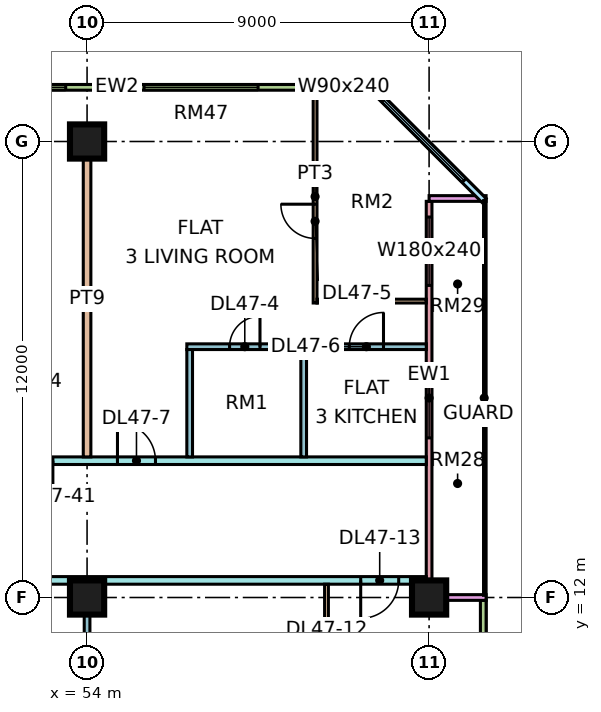
"""IFC4 building model, lengths in metres.
Left out: names, types, materials, properties, quantities, classifications, styles, units other than length and angle.
Written with IfcOpenShell. Run it as: python <this file> out.ifc"""

import sys

from ifc_helpers import new_model, si_unit, direction, frame, frame_2d, origin, origin_2d, place, context, subcontext, project, spatial, rectangle, extrude, element, fill, save


model = new_model("IFC4")
c1 = context("Model", 3, precision=1e-05, world=origin(), true_north=direction((0.0, 1.0)))
c2 = subcontext(c1, "Body", "Model", "MODEL_VIEW")
j1 = project(units=[si_unit("LENGTHUNIT", "METRE"), si_unit("PLANEANGLEUNIT", "RADIAN")], contexts=[c1])
p1 = place(None, origin())
s1 = spatial("IfcSite", under=j1, at=p1, CompositionType="ELEMENT")
p2 = place(p1, origin())
s2 = spatial("IfcBuilding", under=s1, at=p2, CompositionType="ELEMENT")
p3 = place(p2, frame((0.0, 0.0, 202.4)))
s3 = spatial("IfcBuildingStorey", under=s2, at=p3, CompositionType="ELEMENT", Elevation=202.4)
for number, where, z_axis, x_axis in (
    (1, (54.0, 12.0, 0.0), (0.0, 0.0, 1.0), (1.0, 0.0, 0.0)),
    (2, (54.0, 24.0, 0.0), (0.0, 0.0, 1.0), (1.0, 0.0, 0.0)),
    (3, (63.0, 12.0, 0.0), (0.0, 0.0, 1.0), (1.0, 0.0, 0.0)),
):
    element("IfcColumn", number, at=place(p3, frame(where, z_axis=z_axis, x_axis=x_axis)), inside=s3, PredefinedType="COLUMN", context=c2, shape_type="SweptSolid", body=[
        extrude(rectangle(XDim=0.9, YDim=0.9, at=origin_2d()), origin(), (0.0, 0.0, 1.0), 3.75),
    ])
p4 = place(p3, frame((61.5, 25.425, 0.0), z_axis=(0.0, 0.0, 1.0), x_axis=(-1.0, 0.0, 0.0)))
e4 = element("IfcWall", 4, at=p4, inside=s3, PredefinedType="SOLIDWALL", context=c2, shape_type="SweptSolid", body=[
    extrude(rectangle(XDim=13.425, YDim=0.15, at=frame_2d((6.712, 0.0))), origin(), (0.0, 0.0, 1.0), 3.3),
])
p5 = place(p4, frame((0.3, 0.0, 0.45)))
e5 = element("IfcOpeningElement", 5, at=p5, cuts=e4, PredefinedType="OPENING", context=c2, shape_type="SweptSolid", body=[
    extrude(rectangle(XDim=0.9, YDim=2.4, at=frame_2d((0.45, 1.2))), frame((0.0, 0.085, 0.0), z_axis=(0.0, -1.0, 0.0), x_axis=(1.0, 0.0, 0.0)), (0.0, 0.0, 1.0), 0.17),
])
p6 = place(p4, frame((3.0, 0.0, 0.45)))
e6 = element("IfcOpeningElement", 6, at=p6, cuts=e4, PredefinedType="OPENING", context=c2, shape_type="SweptSolid", body=[
    extrude(rectangle(XDim=3.0, YDim=2.4, at=frame_2d((1.5, 1.2))), frame((0.0, 0.085, 0.0), z_axis=(0.0, -1.0, 0.0), x_axis=(1.0, 0.0, 0.0)), (0.0, 0.0, 1.0), 0.17),
])
p7 = place(p4, frame((8.062, 0.0, 0.45)))
e7 = element("IfcOpeningElement", 7, at=p7, cuts=e4, PredefinedType="OPENING", context=c2, shape_type="SweptSolid", body=[
    extrude(rectangle(XDim=4.8, YDim=2.4, at=frame_2d((2.4, 1.2))), frame((0.0, 0.085, 0.0), z_axis=(0.0, -1.0, 0.0), x_axis=(1.0, 0.0, 0.0)), (0.0, 0.0, 1.0), 0.17),
])
p8 = place(p3, frame((64.425, 1.5, 0.0), z_axis=(0.0, 0.0, 1.0), x_axis=(0.0, 1.0, 0.0)))
e8 = element("IfcWall", 8, at=p8, inside=s3, PredefinedType="SOLIDWALL", context=c2, shape_type="SweptSolid", body=[
    extrude(rectangle(XDim=10.425, YDim=0.15, at=frame_2d((5.212, 0.0))), origin(), (0.0, 0.0, 1.0), 3.3),
])
p9 = place(p8, frame((3.712, 0.0, 0.45)))
e9 = element("IfcOpeningElement", 9, at=p9, cuts=e8, PredefinedType="OPENING", context=c2, shape_type="SweptSolid", body=[
    extrude(rectangle(XDim=3.0, YDim=2.4, at=frame_2d((1.5, 1.2))), frame((0.0, 0.085, 0.0), z_axis=(0.0, -1.0, 0.0), x_axis=(1.0, 0.0, 0.0)), (0.0, 0.0, 1.0), 0.17),
])
p10 = place(p3, frame((63.0, 12.075, 0.0), z_axis=(0.0, 0.0, 1.0), x_axis=(0.0, 1.0, 0.0)))
e10 = element("IfcWall", 10, at=p10, inside=s3, PredefinedType="SOLIDWALL", context=c2, shape_type="SweptSolid", body=[
    extrude(rectangle(XDim=10.35, YDim=0.15, at=frame_2d((5.175, 0.0))), origin(), (0.0, 0.0, 1.0), 3.3),
])
p11 = place(p10, frame((4.125, 0.0, 0.45)))
e11 = element("IfcOpeningElement", 11, at=p11, cuts=e10, PredefinedType="OPENING", context=c2, shape_type="SweptSolid", body=[
    extrude(rectangle(XDim=1.8, YDim=2.4, at=frame_2d((0.9, 1.2))), frame((0.0, 0.085, 0.0), z_axis=(0.0, -1.0, 0.0), x_axis=(1.0, 0.0, 0.0)), (0.0, 0.0, 1.0), 0.17),
])
p12 = place(p10, frame((8.137, 0.0, 0.45)))
e12 = element("IfcOpeningElement", 12, at=p12, cuts=e10, PredefinedType="OPENING", context=c2, shape_type="SweptSolid", body=[
    extrude(rectangle(XDim=1.8, YDim=2.4, at=frame_2d((0.9, 1.2))), frame((0.0, 0.085, 0.0), z_axis=(0.0, -1.0, 0.0), x_axis=(1.0, 0.0, 0.0)), (0.0, 0.0, 1.0), 0.17),
])
for number, where, z_axis, x_axis in (
    (13, (64.5, 12.0, 0.0), (0.0, 0.0, 1.0), (-1.0, 0.0, 0.0)),
    (14, (64.5, 22.5, 0.0), (0.0, 0.0, 1.0), (-1.0, 0.0, 0.0)),
):
    element("IfcWall", number, at=place(p3, frame(where, z_axis=z_axis, x_axis=x_axis)), inside=s3, PredefinedType="SOLIDWALL", context=c2, shape_type="SweptSolid", body=[
        extrude(rectangle(XDim=1.5, YDim=0.15, at=frame_2d((0.75, 0.0))), origin(), (0.0, 0.0, 1.0), 3.3),
    ])
p13 = place(p3, frame((64.447, 22.447, 0.0), z_axis=(0.0, 0.0, 1.0), x_axis=(-0.707106781187, 0.707106781187, 0.0)))
e15 = element("IfcWall", 15, at=p13, inside=s3, PredefinedType="SOLIDWALL", context=c2, shape_type="SweptSolid", body=[
    extrude(rectangle(XDim=4.243, YDim=0.15, at=frame_2d((2.121, 0.0))), origin(), (0.0, 0.0, 1.0), 3.3),
])
p14 = place(p13, frame((0.744, 0.0, 0.45)))
e16 = element("IfcOpeningElement", 16, at=p14, cuts=e15, PredefinedType="OPENING", context=c2, shape_type="SweptSolid", body=[
    extrude(rectangle(XDim=3.0, YDim=2.4, at=frame_2d((1.5, 1.2))), frame((0.0, 0.085, 0.0), z_axis=(0.0, -1.0, 0.0), x_axis=(1.0, 0.0, 0.0)), (0.0, 0.0, 1.0), 0.17),
])
p15 = place(p3, frame((40.65, 12.45, 0.0), z_axis=(0.0, 0.0, 1.0), x_axis=(1.0, 0.0, 0.0)))
e17 = element("IfcWall", 17, at=p15, inside=s3, PredefinedType="PARTITIONING", context=c2, shape_type="SweptSolid", body=[
    extrude(rectangle(XDim=22.276, YDim=0.2, at=frame_2d((11.138, 0.0))), origin(), (0.0, 0.0, 1.0), 3.3),
])
p16 = place(p15, frame((20.55, 0.0, 0.0)))
e18 = element("IfcOpeningElement", 18, at=p16, cuts=e17, PredefinedType="OPENING", context=c2, shape_type="SweptSolid", body=[
    extrude(rectangle(XDim=1.0, YDim=2.1, at=frame_2d((0.5, 1.05))), frame((0.0, 0.11, 0.0), z_axis=(0.0, -1.0, 0.0), x_axis=(1.0, 0.0, 0.0)), (0.0, 0.0, 1.0), 0.22),
])
p17 = place(p15, frame((1.05, 0.0, 0.0)))
e19 = element("IfcOpeningElement", 19, at=p17, cuts=e17, PredefinedType="OPENING", context=c2, shape_type="SweptSolid", body=[
    extrude(rectangle(XDim=1.0, YDim=2.1, at=frame_2d((0.5, 1.05))), frame((0.0, 0.11, 0.0), z_axis=(0.0, -1.0, 0.0), x_axis=(1.0, 0.0, 0.0)), (0.0, 0.0, 1.0), 0.22),
])
p18 = place(p3, frame((51.225, 15.6, 0.0), z_axis=(0.0, 0.0, 1.0), x_axis=(1.0, 0.0, 0.0)))
e20 = element("IfcWall", 20, at=p18, inside=s3, PredefinedType="PARTITIONING", context=c2, shape_type="SweptSolid", body=[
    extrude(rectangle(XDim=11.701, YDim=0.2, at=frame_2d((5.851, 0.0))), origin(), (0.0, 0.0, 1.0), 3.3),
])
p19 = place(p18, frame((3.575, 0.0, 0.0)))
e21 = element("IfcOpeningElement", 21, at=p19, cuts=e20, PredefinedType="OPENING", context=c2, shape_type="SweptSolid", body=[
    extrude(rectangle(XDim=1.0, YDim=2.1, at=frame_2d((0.5, 1.05))), frame((0.0, 0.11, 0.0), z_axis=(0.0, -1.0, 0.0), x_axis=(1.0, 0.0, 0.0)), (0.0, 0.0, 1.0), 0.22),
])
p20 = place(p18, frame((0.875, 0.0, 0.0)))
e22 = element("IfcOpeningElement", 22, at=p20, cuts=e20, PredefinedType="OPENING", context=c2, shape_type="SweptSolid", body=[
    extrude(rectangle(XDim=1.0, YDim=2.1, at=frame_2d((0.5, 1.05))), frame((0.0, 0.11, 0.0), z_axis=(0.0, -1.0, 0.0), x_axis=(1.0, 0.0, 0.0)), (0.0, 0.0, 1.0), 0.22),
])
p21 = place(p3, frame((54.0, 7.725, 0.0), z_axis=(0.0, 0.0, 1.0), x_axis=(0.0, 1.0, 0.0)))
e23 = element("IfcWall", 23, at=p21, inside=s3, PredefinedType="PARTITIONING", context=c2, shape_type="SweptSolid", body=[
    extrude(rectangle(XDim=4.625, YDim=0.15, at=frame_2d((2.312, 0.0))), origin(), (0.0, 0.0, 1.0), 3.3),
])
p22 = place(p3, frame((54.0, 15.7, 0.0), z_axis=(0.0, 0.0, 1.0), x_axis=(0.0, 1.0, 0.0)))
e24 = element("IfcWall", 24, at=p22, inside=s3, PredefinedType="PARTITIONING", context=c2, shape_type="SweptSolid", body=[
    extrude(rectangle(XDim=8.3, YDim=0.2, at=frame_2d((4.15, 0.0))), origin(), (0.0, 0.0, 1.0), 3.3),
])
p23 = place(p3, frame((56.625, 18.6, 0.0), z_axis=(0.0, 0.0, 1.0), x_axis=(1.0, 0.0, 0.0)))
e25 = element("IfcWall", 25, at=p23, inside=s3, PredefinedType="PARTITIONING", context=c2, shape_type="SweptSolid", body=[
    extrude(rectangle(XDim=6.301, YDim=0.15, at=frame_2d((3.15, 0.0))), origin(), (0.0, 0.0, 1.0), 3.3),
])
p24 = place(p23, frame((1.125, 0.0, 0.0)))
e26 = element("IfcOpeningElement", 26, at=p24, cuts=e25, PredefinedType="OPENING", context=c2, shape_type="SweptSolid", body=[
    extrude(rectangle(XDim=0.8, YDim=2.1, at=frame_2d((0.4, 1.05))), frame((0.0, 0.085, 0.0), z_axis=(0.0, -1.0, 0.0), x_axis=(1.0, 0.0, 0.0)), (0.0, 0.0, 1.0), 0.17),
])
p25 = place(p23, frame((4.275, 0.0, 0.0)))
e27 = element("IfcOpeningElement", 27, at=p25, cuts=e25, PredefinedType="OPENING", context=c2, shape_type="SweptSolid", body=[
    extrude(rectangle(XDim=0.9, YDim=2.1, at=frame_2d((0.45, 1.05))), frame((0.0, 0.085, 0.0), z_axis=(0.0, -1.0, 0.0), x_axis=(1.0, 0.0, 0.0)), (0.0, 0.0, 1.0), 0.17),
])
for number, where, z_axis, x_axis in (
    (28, (56.7, 15.7, 0.0), (0.0, 0.0, 1.0), (0.0, 1.0, 0.0)),
    (29, (59.7, 15.7, 0.0), (0.0, 0.0, 1.0), (0.0, 1.0, 0.0)),
):
    element("IfcWall", number, at=place(p3, frame(where, z_axis=z_axis, x_axis=x_axis)), inside=s3, PredefinedType="PARTITIONING", context=c2, shape_type="SweptSolid", body=[
        extrude(rectangle(XDim=2.825, YDim=0.15, at=frame_2d((1.413, 0.0))), origin(), (0.0, 0.0, 1.0), 3.3),
    ])
p26 = place(p3, frame((60.0, 19.75, 0.0), z_axis=(0.0, 0.0, 1.0), x_axis=(0.0, 1.0, 0.0)))
e30 = element("IfcWall", 30, at=p26, inside=s3, PredefinedType="PARTITIONING", context=c2, shape_type="SweptSolid", body=[
    extrude(rectangle(XDim=5.6, YDim=0.1, at=frame_2d((2.8, 0.0))), origin(), (0.0, 0.0, 1.0), 3.3),
])
p27 = place(p26, frame((1.7, 0.0, 0.0)))
e31 = element("IfcOpeningElement", 31, at=p27, cuts=e30, PredefinedType="OPENING", context=c2, shape_type="SweptSolid", body=[
    extrude(rectangle(XDim=0.9, YDim=2.1, at=frame_2d((0.45, 1.05))), frame((0.0, 0.06, 0.0), z_axis=(0.0, -1.0, 0.0), x_axis=(1.0, 0.0, 0.0)), (0.0, 0.0, 1.0), 0.12),
])
p28 = place(p3, frame((60.05, 19.8, 0.0), z_axis=(0.0, 0.0, 1.0), x_axis=(1.0, 0.0, 0.0)))
e32 = element("IfcWall", 32, at=p28, inside=s3, PredefinedType="PARTITIONING", context=c2, shape_type="SweptSolid", body=[
    extrude(rectangle(XDim=2.876, YDim=0.1, at=frame_2d((1.438, 0.0))), origin(), (0.0, 0.0, 1.0), 3.3),
])
p29 = place(p3, frame((60.3, 7.725, 0.0), z_axis=(0.0, 0.0, 1.0), x_axis=(0.0, 1.0, 0.0)))
e33 = element("IfcWall", 33, at=p29, inside=s3, PredefinedType="PARTITIONING", context=c2, shape_type="SweptSolid", body=[
    extrude(rectangle(XDim=4.625, YDim=0.1, at=frame_2d((2.312, 0.0))), origin(), (0.0, 0.0, 1.0), 3.3),
])
p30 = place(p29, frame((1.875, 0.0, 0.0)))
e34 = element("IfcOpeningElement", 34, at=p30, cuts=e33, PredefinedType="OPENING", context=c2, shape_type="SweptSolid", body=[
    extrude(rectangle(XDim=0.9, YDim=2.1, at=frame_2d((0.45, 1.05))), frame((0.0, 0.06, 0.0), z_axis=(0.0, -1.0, 0.0), x_axis=(1.0, 0.0, 0.0)), (0.0, 0.0, 1.0), 0.12),
])
p31 = place(p5, origin())
e35 = element("IfcWindow", 35, at=p31, inside=s3, PartitioningType="SINGLE_PANEL", PredefinedType="WINDOW", context=c2, shape_type="SweptSolid", body=[
    extrude(rectangle(XDim=0.9, YDim=2.4, at=frame_2d((0.45, 1.2))), frame((0.0, 0.03, 0.0), z_axis=(0.0, -1.0, 0.0), x_axis=(1.0, 0.0, 0.0)), (0.0, 0.0, 1.0), 0.06),
])
fill(e5, e35)
p32 = place(p6, origin())
e36 = element("IfcWindow", 36, at=p32, inside=s3, PartitioningType="SINGLE_PANEL", PredefinedType="WINDOW", context=c2, shape_type="SweptSolid", body=[
    extrude(rectangle(XDim=3.0, YDim=2.4, at=frame_2d((1.5, 1.2))), frame((0.0, 0.03, 0.0), z_axis=(0.0, -1.0, 0.0), x_axis=(1.0, 0.0, 0.0)), (0.0, 0.0, 1.0), 0.06),
])
fill(e6, e36)
p33 = place(p7, origin())
e37 = element("IfcWindow", 37, at=p33, inside=s3, PartitioningType="SINGLE_PANEL", PredefinedType="WINDOW", context=c2, shape_type="SweptSolid", body=[
    extrude(rectangle(XDim=4.8, YDim=2.4, at=frame_2d((2.4, 1.2))), frame((0.0, 0.03, 0.0), z_axis=(0.0, -1.0, 0.0), x_axis=(1.0, 0.0, 0.0)), (0.0, 0.0, 1.0), 0.06),
])
fill(e7, e37)
p34 = place(p11, origin())
e38 = element("IfcWindow", 38, at=p34, inside=s3, PartitioningType="SINGLE_PANEL", PredefinedType="WINDOW", context=c2, shape_type="SweptSolid", body=[
    extrude(rectangle(XDim=1.8, YDim=2.4, at=frame_2d((0.9, 1.2))), frame((0.0, 0.03, 0.0), z_axis=(0.0, -1.0, 0.0), x_axis=(1.0, 0.0, 0.0)), (0.0, 0.0, 1.0), 0.06),
])
fill(e11, e38)
p35 = place(p12, origin())
e39 = element("IfcWindow", 39, at=p35, inside=s3, PartitioningType="SINGLE_PANEL", PredefinedType="WINDOW", context=c2, shape_type="SweptSolid", body=[
    extrude(rectangle(XDim=1.8, YDim=2.4, at=frame_2d((0.9, 1.2))), frame((0.0, 0.03, 0.0), z_axis=(0.0, -1.0, 0.0), x_axis=(1.0, 0.0, 0.0)), (0.0, 0.0, 1.0), 0.06),
])
fill(e12, e39)
p36 = place(p14, origin())
e40 = element("IfcWindow", 40, at=p36, inside=s3, PartitioningType="SINGLE_PANEL", PredefinedType="WINDOW", context=c2, shape_type="SweptSolid", body=[
    extrude(rectangle(XDim=3.0, YDim=2.4, at=frame_2d((1.5, 1.2))), frame((0.0, 0.03, 0.0), z_axis=(0.0, -1.0, 0.0), x_axis=(1.0, 0.0, 0.0)), (0.0, 0.0, 1.0), 0.06),
])
fill(e16, e40)
p37 = place(p24, frame((0.8, 0.0, 0.0), z_axis=(0.0, 0.0, 1.0), x_axis=(-1.0, 0.0, 0.0)))
e41 = element("IfcDoor", 41, at=p37, inside=s3, OperationType="SINGLE_SWING_RIGHT", PredefinedType="DOOR", context=c2, shape_type="SweptSolid", body=[
    extrude(rectangle(XDim=0.8, YDim=2.1, at=frame_2d((0.4, 1.05))), frame((0.0, 0.025, 0.0), z_axis=(0.0, -1.0, 0.0), x_axis=(1.0, 0.0, 0.0)), (0.0, 0.0, 1.0), 0.05),
])
fill(e26, e41)
p38 = place(p27, frame((0.9, 0.0, 0.0), z_axis=(0.0, 0.0, 1.0), x_axis=(-1.0, 0.0, 0.0)))
e42 = element("IfcDoor", 42, at=p38, inside=s3, OperationType="SINGLE_SWING_RIGHT", PredefinedType="DOOR", context=c2, shape_type="SweptSolid", body=[
    extrude(rectangle(XDim=0.9, YDim=2.1, at=frame_2d((0.45, 1.05))), frame((0.0, 0.025, 0.0), z_axis=(0.0, -1.0, 0.0), x_axis=(1.0, 0.0, 0.0)), (0.0, 0.0, 1.0), 0.05),
])
fill(e31, e42)
p39 = place(p25, frame((0.9, 0.0, 0.0), z_axis=(0.0, 0.0, 1.0), x_axis=(-1.0, 0.0, 0.0)))
e43 = element("IfcDoor", 43, at=p39, inside=s3, OperationType="SINGLE_SWING_RIGHT", PredefinedType="DOOR", context=c2, shape_type="SweptSolid", body=[
    extrude(rectangle(XDim=0.9, YDim=2.1, at=frame_2d((0.45, 1.05))), frame((0.0, 0.025, 0.0), z_axis=(0.0, -1.0, 0.0), x_axis=(1.0, 0.0, 0.0)), (0.0, 0.0, 1.0), 0.05),
])
fill(e27, e43)
p40 = place(p19, origin())
e44 = element("IfcDoor", 44, at=p40, inside=s3, OperationType="SINGLE_SWING_LEFT", PredefinedType="DOOR", context=c2, shape_type="SweptSolid", body=[
    extrude(rectangle(XDim=1.0, YDim=2.1, at=frame_2d((0.5, 1.05))), frame((0.0, 0.025, 0.0), z_axis=(0.0, -1.0, 0.0), x_axis=(1.0, 0.0, 0.0)), (0.0, 0.0, 1.0), 0.05),
])
fill(e21, e44)
p41 = place(p16, frame((1.0, 0.0, 0.0), z_axis=(0.0, 0.0, 1.0), x_axis=(-1.0, 0.0, 0.0)))
e45 = element("IfcDoor", 45, at=p41, inside=s3, OperationType="SINGLE_SWING_LEFT", PredefinedType="DOOR", context=c2, shape_type="SweptSolid", body=[
    extrude(rectangle(XDim=1.0, YDim=2.1, at=frame_2d((0.5, 1.05))), frame((0.0, 0.025, 0.0), z_axis=(0.0, -1.0, 0.0), x_axis=(1.0, 0.0, 0.0)), (0.0, 0.0, 1.0), 0.05),
])
fill(e18, e45)
p42 = place(p20, origin())
e46 = element("IfcDoor", 46, at=p42, inside=s3, OperationType="SINGLE_SWING_RIGHT", PredefinedType="DOOR", context=c2, shape_type="SweptSolid", body=[
    extrude(rectangle(XDim=1.0, YDim=2.1, at=frame_2d((0.5, 1.05))), frame((0.0, 0.025, 0.0), z_axis=(0.0, -1.0, 0.0), x_axis=(1.0, 0.0, 0.0)), (0.0, 0.0, 1.0), 0.05),
])
fill(e22, e46)
save(model, sys.argv[1])
